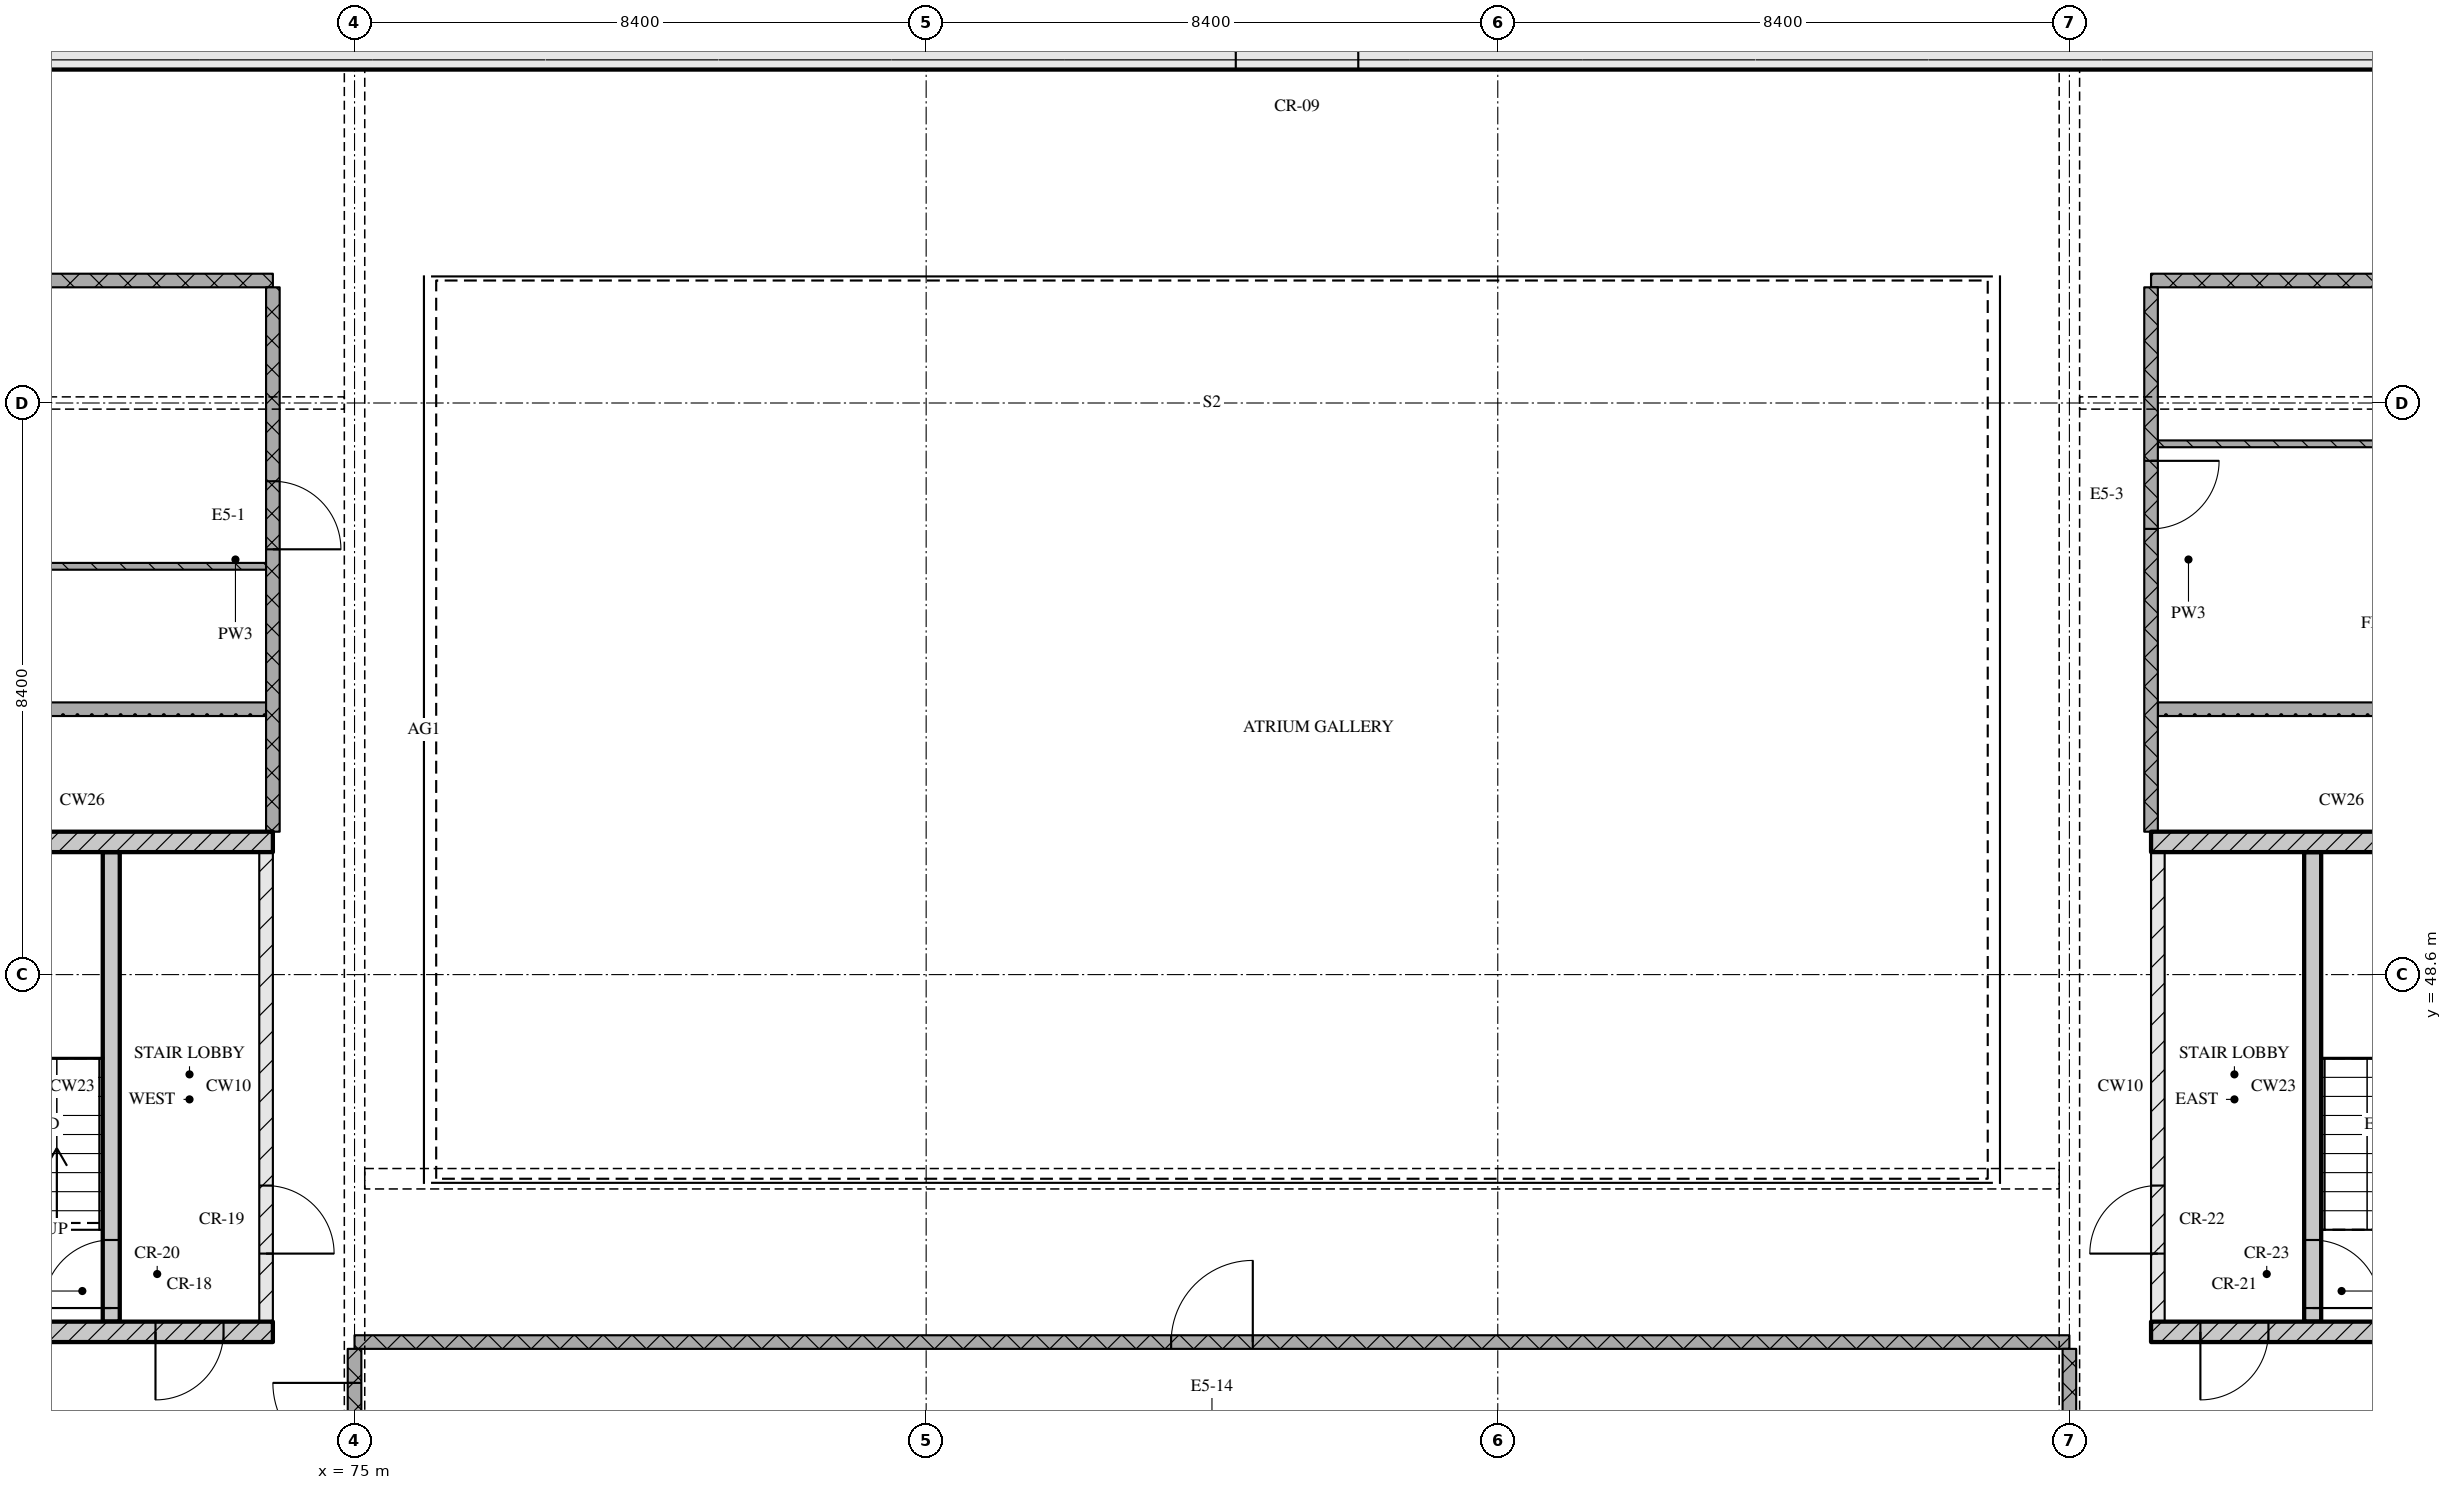
"""IFC4 building model, lengths in metres.
Left out: names, types, materials, properties, quantities, classifications, styles, units other than length and angle.
Written with IfcOpenShell. Run it as: python <this file> out.ifc"""

import sys

from ifc_helpers import new_model, si_unit, direction, frame, frame_2d, origin, place, context, subcontext, project, spatial, rectangle, extrude, element, fill, save


model = new_model("IFC4")
c1 = context("Model", 3, precision=1e-05, world=origin(), true_north=direction((0.0, 1.0)))
c2 = subcontext(c1, "Body", "Model", "MODEL_VIEW")
j1 = project(units=[si_unit("LENGTHUNIT", "METRE"), si_unit("PLANEANGLEUNIT", "RADIAN")], contexts=[c1])
p1 = place(None, origin())
s1 = spatial("IfcSite", under=j1, at=p1, CompositionType="ELEMENT")
p2 = place(p1, origin())
s2 = spatial("IfcBuilding", under=s1, at=p2, CompositionType="ELEMENT")
p3 = place(p2, frame((0.0, 0.0, 288.75)))
s3 = spatial("IfcBuildingStorey", under=s2, at=p3, CompositionType="ELEMENT", Elevation=288.75)
p4 = place(p3, frame((67.3, 62.15, 0.0), z_axis=(0.0, 0.0, 1.0), x_axis=(1.0, 0.0, 0.0)))
e1 = element("IfcWall", 1, at=p4, inside=s3, PredefinedType="SOLIDWALL", context=c2, shape_type="SweptSolid", body=[
    extrude(rectangle(XDim=40.6, YDim=0.5, at=frame_2d((20.3, 0.0))), origin(), (0.0, 0.0, 1.0), 3.32),
])
p5 = place(p4, frame((20.65, 0.0, 0.0)))
e2 = element("IfcOpeningElement", 2, at=p5, cuts=e1, PredefinedType="OPENING", context=c2, shape_type="SweptSolid", body=[
    extrude(rectangle(XDim=1.8, YDim=2.1, at=frame_2d((0.9, 1.05))), frame((0.0, 0.26, 0.0), z_axis=(0.0, -1.0, 0.0), x_axis=(1.0, 0.0, 0.0)), (0.0, 0.0, 1.0), 0.52),
])
p6 = place(p3, frame((68.2, 43.35, 0.0), z_axis=(0.0, 0.0, 1.0), x_axis=(1.0, 0.0, 0.0)))
e3 = element("IfcWall", 3, at=p6, inside=s3, PredefinedType="SOLIDWALL", context=c2, shape_type="SweptSolid", body=[
    extrude(rectangle(XDim=5.6, YDim=0.3, at=frame_2d((2.8, 0.0))), origin(), (0.0, 0.0, 1.0), 3.32),
])
p7 = place(p6, frame((3.875, 0.0, 0.0)))
e4 = element("IfcOpeningElement", 4, at=p7, cuts=e3, PredefinedType="OPENING", context=c2, shape_type="SweptSolid", body=[
    extrude(rectangle(XDim=1.0, YDim=2.1, at=frame_2d((0.5, 1.05))), frame((0.0, 0.16, 0.0), z_axis=(0.0, -1.0, 0.0), x_axis=(1.0, 0.0, 0.0)), (0.0, 0.0, 1.0), 0.32),
])
p8 = place(p3, frame((71.425, 43.5, 0.0), z_axis=(0.0, 0.0, 1.0), x_axis=(0.0, 1.0, 0.0)))
e5 = element("IfcWall", 5, at=p8, inside=s3, PredefinedType="SOLIDWALL", context=c2, shape_type="SweptSolid", body=[
    extrude(rectangle(XDim=6.9, YDim=0.25, at=frame_2d((3.45, 0.0))), origin(), (0.0, 0.0, 1.0), 3.32),
])
p9 = place(p8, frame((0.2, 0.0, 0.0)))
e6 = element("IfcOpeningElement", 6, at=p9, cuts=e5, PredefinedType="OPENING", context=c2, shape_type="SweptSolid", body=[
    extrude(rectangle(XDim=1.0, YDim=2.1, at=frame_2d((0.5, 1.05))), frame((0.0, 0.135, 0.0), z_axis=(0.0, -1.0, 0.0), x_axis=(1.0, 0.0, 0.0)), (0.0, 0.0, 1.0), 0.27),
])
p10 = place(p3, frame((73.7, 43.5, 0.0), z_axis=(0.0, 0.0, 1.0), x_axis=(0.0, 1.0, 0.0)))
e7 = element("IfcWall", 7, at=p10, inside=s3, PredefinedType="PARTITIONING", context=c2, shape_type="SweptSolid", body=[
    extrude(rectangle(XDim=6.9, YDim=0.2, at=frame_2d((3.45, 0.0))), origin(), (0.0, 0.0, 1.0), 3.32),
])
p11 = place(p10, frame((1.0, 0.0, 0.0)))
e8 = element("IfcOpeningElement", 8, at=p11, cuts=e7, PredefinedType="OPENING", context=c2, shape_type="SweptSolid", body=[
    extrude(rectangle(XDim=1.0, YDim=2.1, at=frame_2d((0.5, 1.05))), frame((0.0, 0.11, 0.0), z_axis=(0.0, -1.0, 0.0), x_axis=(1.0, 0.0, 0.0)), (0.0, 0.0, 1.0), 0.22),
])
p12 = place(p3, frame((68.2, 50.55, 0.0), z_axis=(0.0, 0.0, 1.0), x_axis=(1.0, 0.0, 0.0)))
e9 = element("IfcWall", 9, at=p12, inside=s3, PredefinedType="SOLIDWALL", context=c2, shape_type="SweptSolid", body=[
    extrude(rectangle(XDim=5.6, YDim=0.3, at=frame_2d((2.8, 0.0))), origin(), (0.0, 0.0, 1.0), 3.32),
])
p13 = place(p3, frame((101.4, 43.35, 0.0), z_axis=(0.0, 0.0, 1.0), x_axis=(1.0, 0.0, 0.0)))
e10 = element("IfcWall", 10, at=p13, inside=s3, PredefinedType="SOLIDWALL", context=c2, shape_type="SweptSolid", body=[
    extrude(rectangle(XDim=5.6, YDim=0.3, at=frame_2d((2.8, 0.0))), origin(), (0.0, 0.0, 1.0), 3.32),
])
p14 = place(p13, frame((0.725, 0.0, 0.0)))
e11 = element("IfcOpeningElement", 11, at=p14, cuts=e10, PredefinedType="OPENING", context=c2, shape_type="SweptSolid", body=[
    extrude(rectangle(XDim=1.0, YDim=2.1, at=frame_2d((0.5, 1.05))), frame((0.0, 0.16, 0.0), z_axis=(0.0, -1.0, 0.0), x_axis=(1.0, 0.0, 0.0)), (0.0, 0.0, 1.0), 0.32),
])
p15 = place(p3, frame((101.5, 43.5, 0.0), z_axis=(0.0, 0.0, 1.0), x_axis=(0.0, 1.0, 0.0)))
e12 = element("IfcWall", 12, at=p15, inside=s3, PredefinedType="PARTITIONING", context=c2, shape_type="SweptSolid", body=[
    extrude(rectangle(XDim=6.9, YDim=0.2, at=frame_2d((3.45, 0.0))), origin(), (0.0, 0.0, 1.0), 3.32),
])
p16 = place(p15, frame((1.0, 0.0, 0.0)))
e13 = element("IfcOpeningElement", 13, at=p16, cuts=e12, PredefinedType="OPENING", context=c2, shape_type="SweptSolid", body=[
    extrude(rectangle(XDim=1.0, YDim=2.1, at=frame_2d((0.5, 1.05))), frame((0.0, 0.11, 0.0), z_axis=(0.0, -1.0, 0.0), x_axis=(1.0, 0.0, 0.0)), (0.0, 0.0, 1.0), 0.22),
])
p17 = place(p3, frame((103.775, 43.5, 0.0), z_axis=(0.0, 0.0, 1.0), x_axis=(0.0, 1.0, 0.0)))
e14 = element("IfcWall", 14, at=p17, inside=s3, PredefinedType="SOLIDWALL", context=c2, shape_type="SweptSolid", body=[
    extrude(rectangle(XDim=6.9, YDim=0.25, at=frame_2d((3.45, 0.0))), origin(), (0.0, 0.0, 1.0), 3.32),
])
p18 = place(p17, frame((0.2, 0.0, 0.0)))
e15 = element("IfcOpeningElement", 15, at=p18, cuts=e14, PredefinedType="OPENING", context=c2, shape_type="SweptSolid", body=[
    extrude(rectangle(XDim=1.0, YDim=2.1, at=frame_2d((0.5, 1.05))), frame((0.0, 0.135, 0.0), z_axis=(0.0, -1.0, 0.0), x_axis=(1.0, 0.0, 0.0)), (0.0, 0.0, 1.0), 0.27),
])
p19 = place(p3, frame((101.4, 50.55, 0.0), z_axis=(0.0, 0.0, 1.0), x_axis=(1.0, 0.0, 0.0)))
e16 = element("IfcWall", 16, at=p19, inside=s3, PredefinedType="SOLIDWALL", context=c2, shape_type="SweptSolid", body=[
    extrude(rectangle(XDim=5.6, YDim=0.3, at=frame_2d((2.8, 0.0))), origin(), (0.0, 0.0, 1.0), 3.32),
])
p20 = place(p3, frame((100.2, 43.2, 0.0), z_axis=(0.0, 0.0, 1.0), x_axis=(-1.0, 0.0, 0.0)))
e17 = element("IfcWall", 17, at=p20, inside=s3, PredefinedType="PARTITIONING", context=c2, shape_type="SweptSolid", body=[
    extrude(rectangle(XDim=25.2, YDim=0.2, at=frame_2d((12.6, 0.0))), origin(), (0.0, 0.0, 1.0), 3.32),
])
p21 = place(p20, frame((12.0, 0.0, 0.0)))
e18 = element("IfcOpeningElement", 18, at=p21, cuts=e17, PredefinedType="OPENING", context=c2, shape_type="SweptSolid", body=[
    extrude(rectangle(XDim=1.2, YDim=2.1, at=frame_2d((0.6, 1.05))), frame((0.0, 0.11, 0.0), z_axis=(0.0, -1.0, 0.0), x_axis=(1.0, 0.0, 0.0)), (0.0, 0.0, 1.0), 0.22),
])
for number, where, z_axis, x_axis in (
    (19, (56.68, 52.5, 0.0), (0.0, 0.0, 1.0), (1.0, 0.0, 0.0)),
    (20, (101.5, 52.5, 0.0), (0.0, 0.0, 1.0), (1.0, 0.0, 0.0)),
):
    element("IfcWall", number, at=place(p3, frame(where, z_axis=z_axis, x_axis=x_axis)), inside=s3, PredefinedType="PARTITIONING", context=c2, shape_type="SweptSolid", body=[
        extrude(rectangle(XDim=17.02, YDim=0.2, at=frame_2d((8.51, 0.0))), origin(), (0.0, 0.0, 1.0), 3.32),
    ])
p22 = place(p3, frame((73.7, 54.6, 0.0), z_axis=(0.0, 0.0, 1.0), x_axis=(-1.0, 0.0, 0.0)))
e21 = element("IfcWall", 21, at=p22, inside=s3, PredefinedType="PARTITIONING", context=c2, shape_type="SweptSolid", body=[
    extrude(rectangle(XDim=8.9, YDim=0.1, at=frame_2d((4.45, 0.0))), origin(), (0.0, 0.0, 1.0), 3.32),
])
p23 = place(p22, frame((4.0, 0.0, 0.0)))
e22 = element("IfcOpeningElement", 22, at=p23, cuts=e21, PredefinedType="OPENING", context=c2, shape_type="SweptSolid", body=[
    extrude(rectangle(XDim=0.8, YDim=2.1, at=frame_2d((0.4, 1.05))), frame((0.0, 0.06, 0.0), z_axis=(0.0, -1.0, 0.0), x_axis=(1.0, 0.0, 0.0)), (0.0, 0.0, 1.0), 0.12),
])
p24 = place(p3, frame((101.5, 56.4, 0.0), z_axis=(0.0, 0.0, 1.0), x_axis=(1.0, 0.0, 0.0)))
e23 = element("IfcWall", 23, at=p24, inside=s3, PredefinedType="PARTITIONING", context=c2, shape_type="SweptSolid", body=[
    extrude(rectangle(XDim=8.0, YDim=0.1, at=frame_2d((4.0, 0.0))), origin(), (0.0, 0.0, 1.0), 3.32),
])
p25 = place(p24, frame((3.55, 0.0, 0.0)))
e24 = element("IfcOpeningElement", 24, at=p25, cuts=e23, PredefinedType="OPENING", context=c2, shape_type="SweptSolid", body=[
    extrude(rectangle(XDim=0.8, YDim=2.1, at=frame_2d((0.4, 1.05))), frame((0.0, 0.06, 0.0), z_axis=(0.0, -1.0, 0.0), x_axis=(1.0, 0.0, 0.0)), (0.0, 0.0, 1.0), 0.12),
])
for number, where, z_axis, x_axis in (
    (25, (64.2, 58.8, 0.0), (0.0, 0.0, 1.0), (1.0, 0.0, 0.0)),
    (26, (101.4, 58.8, 0.0), (0.0, 0.0, 1.0), (1.0, 0.0, 0.0)),
):
    element("IfcWall", number, at=place(p3, frame(where, z_axis=z_axis, x_axis=x_axis)), inside=s3, PredefinedType="PARTITIONING", context=c2, shape_type="SweptSolid", body=[
        extrude(rectangle(XDim=9.6, YDim=0.2, at=frame_2d((4.8, 0.0))), origin(), (0.0, 0.0, 1.0), 3.32),
    ])
p26 = place(p3, frame((73.8, 50.7, 0.0), z_axis=(0.0, 0.0, 1.0), x_axis=(0.0, 1.0, 0.0)))
e27 = element("IfcWall", 27, at=p26, inside=s3, PredefinedType="PARTITIONING", context=c2, shape_type="SweptSolid", body=[
    extrude(rectangle(XDim=8.0, YDim=0.2, at=frame_2d((4.0, 0.0))), origin(), (0.0, 0.0, 1.0), 3.32),
])
p27 = place(p26, frame((4.15, 0.0, 0.0)))
e28 = element("IfcOpeningElement", 28, at=p27, cuts=e27, PredefinedType="OPENING", context=c2, shape_type="SweptSolid", body=[
    extrude(rectangle(XDim=1.0, YDim=2.1, at=frame_2d((0.5, 1.05))), frame((0.0, 0.11, 0.0), z_axis=(0.0, -1.0, 0.0), x_axis=(1.0, 0.0, 0.0)), (0.0, 0.0, 1.0), 0.22),
])
p28 = place(p3, frame((75.0, 43.1, 0.0), z_axis=(0.0, 0.0, 1.0), x_axis=(0.0, -1.0, 0.0)))
e29 = element("IfcWall", 29, at=p28, inside=s3, PredefinedType="PARTITIONING", context=c2, shape_type="SweptSolid", body=[
    extrude(rectangle(XDim=2.2, YDim=0.2, at=frame_2d((1.1, 0.0))), origin(), (0.0, 0.0, 1.0), 2.53),
])
p29 = place(p28, frame((0.5, 0.0, 0.0)))
e30 = element("IfcOpeningElement", 30, at=p29, cuts=e29, PredefinedType="OPENING", context=c2, shape_type="SweptSolid", body=[
    extrude(rectangle(XDim=1.2, YDim=2.1, at=frame_2d((0.6, 1.05))), frame((0.0, 0.11, 0.0), z_axis=(0.0, -1.0, 0.0), x_axis=(1.0, 0.0, 0.0)), (0.0, 0.0, 1.0), 0.22),
])
p30 = place(p3, frame((100.2, 43.1, 0.0), z_axis=(0.0, 0.0, 1.0), x_axis=(0.0, -1.0, 0.0)))
e31 = element("IfcWall", 31, at=p30, inside=s3, PredefinedType="PARTITIONING", context=c2, shape_type="SweptSolid", body=[
    extrude(rectangle(XDim=2.2, YDim=0.2, at=frame_2d((1.1, 0.0))), origin(), (0.0, 0.0, 1.0), 2.53),
])
p31 = place(p3, frame((101.4, 58.7, 0.0), z_axis=(0.0, 0.0, 1.0), x_axis=(0.0, -1.0, 0.0)))
e32 = element("IfcWall", 32, at=p31, inside=s3, PredefinedType="PARTITIONING", context=c2, shape_type="SweptSolid", body=[
    extrude(rectangle(XDim=8.0, YDim=0.2, at=frame_2d((4.0, 0.0))), origin(), (0.0, 0.0, 1.0), 3.32),
])
p32 = place(p31, frame((2.55, 0.0, 0.0)))
e33 = element("IfcOpeningElement", 33, at=p32, cuts=e32, PredefinedType="OPENING", context=c2, shape_type="SweptSolid", body=[
    extrude(rectangle(XDim=1.0, YDim=2.1, at=frame_2d((0.5, 1.05))), frame((0.0, 0.11, 0.0), z_axis=(0.0, -1.0, 0.0), x_axis=(1.0, 0.0, 0.0)), (0.0, 0.0, 1.0), 0.22),
])
p33 = place(p5, origin())
e34 = element("IfcDoor", 34, at=p33, inside=s3, OperationType="DOUBLE_DOOR_SINGLE_SWING", PredefinedType="DOOR", context=c2, shape_type="SweptSolid", body=[
    extrude(rectangle(XDim=1.8, YDim=2.1, at=frame_2d((0.9, 1.05))), frame((0.0, 0.025, 0.0), z_axis=(0.0, -1.0, 0.0), x_axis=(1.0, 0.0, 0.0)), (0.0, 0.0, 1.0), 0.05),
])
fill(e2, e34)
p34 = place(p7, origin())
e35 = element("IfcDoor", 35, at=p34, inside=s3, OperationType="SINGLE_SWING_RIGHT", PredefinedType="DOOR", context=c2, shape_type="SweptSolid", body=[
    extrude(rectangle(XDim=1.0, YDim=2.1, at=frame_2d((0.5, 1.05))), frame((0.0, 0.025, 0.0), z_axis=(0.0, -1.0, 0.0), x_axis=(1.0, 0.0, 0.0)), (0.0, 0.0, 1.0), 0.05),
])
fill(e4, e35)
p35 = place(p9, origin())
e36 = element("IfcDoor", 36, at=p35, inside=s3, OperationType="SINGLE_SWING_LEFT", PredefinedType="DOOR", context=c2, shape_type="SweptSolid", body=[
    extrude(rectangle(XDim=1.0, YDim=2.1, at=frame_2d((0.5, 1.05))), frame((0.0, 0.025, 0.0), z_axis=(0.0, -1.0, 0.0), x_axis=(1.0, 0.0, 0.0)), (0.0, 0.0, 1.0), 0.05),
])
fill(e6, e36)
p36 = place(p11, origin())
e37 = element("IfcDoor", 37, at=p36, inside=s3, OperationType="SINGLE_SWING_RIGHT", PredefinedType="DOOR", context=c2, shape_type="SweptSolid", body=[
    extrude(rectangle(XDim=1.0, YDim=2.1, at=frame_2d((0.5, 1.05))), frame((0.0, 0.025, 0.0), z_axis=(0.0, -1.0, 0.0), x_axis=(1.0, 0.0, 0.0)), (0.0, 0.0, 1.0), 0.05),
])
fill(e8, e37)
p37 = place(p14, origin())
e38 = element("IfcDoor", 38, at=p37, inside=s3, OperationType="SINGLE_SWING_RIGHT", PredefinedType="DOOR", context=c2, shape_type="SweptSolid", body=[
    extrude(rectangle(XDim=1.0, YDim=2.1, at=frame_2d((0.5, 1.05))), frame((0.0, 0.025, 0.0), z_axis=(0.0, -1.0, 0.0), x_axis=(1.0, 0.0, 0.0)), (0.0, 0.0, 1.0), 0.05),
])
fill(e11, e38)
p38 = place(p18, origin())
e39 = element("IfcDoor", 39, at=p38, inside=s3, OperationType="SINGLE_SWING_RIGHT", PredefinedType="DOOR", context=c2, shape_type="SweptSolid", body=[
    extrude(rectangle(XDim=1.0, YDim=2.1, at=frame_2d((0.5, 1.05))), frame((0.0, 0.025, 0.0), z_axis=(0.0, -1.0, 0.0), x_axis=(1.0, 0.0, 0.0)), (0.0, 0.0, 1.0), 0.05),
])
fill(e15, e39)
p39 = place(p16, origin())
e40 = element("IfcDoor", 40, at=p39, inside=s3, OperationType="SINGLE_SWING_LEFT", PredefinedType="DOOR", context=c2, shape_type="SweptSolid", body=[
    extrude(rectangle(XDim=1.0, YDim=2.1, at=frame_2d((0.5, 1.05))), frame((0.0, 0.025, 0.0), z_axis=(0.0, -1.0, 0.0), x_axis=(1.0, 0.0, 0.0)), (0.0, 0.0, 1.0), 0.05),
])
fill(e13, e40)
p40 = place(p21, origin())
e41 = element("IfcDoor", 41, at=p40, inside=s3, OperationType="SINGLE_SWING_RIGHT", PredefinedType="DOOR", context=c2, shape_type="SweptSolid", body=[
    extrude(rectangle(XDim=1.2, YDim=2.1, at=frame_2d((0.6, 1.05))), frame((0.0, 0.025, 0.0), z_axis=(0.0, -1.0, 0.0), x_axis=(1.0, 0.0, 0.0)), (0.0, 0.0, 1.0), 0.05),
])
fill(e18, e41)
p41 = place(p27, origin())
e42 = element("IfcDoor", 42, at=p41, inside=s3, OperationType="SINGLE_SWING_RIGHT", PredefinedType="DOOR", context=c2, shape_type="SweptSolid", body=[
    extrude(rectangle(XDim=1.0, YDim=2.1, at=frame_2d((0.5, 1.05))), frame((0.0, 0.025, 0.0), z_axis=(0.0, -1.0, 0.0), x_axis=(1.0, 0.0, 0.0)), (0.0, 0.0, 1.0), 0.05),
])
fill(e28, e42)
p42 = place(p29, origin())
e43 = element("IfcDoor", 43, at=p42, inside=s3, OperationType="SINGLE_SWING_RIGHT", PredefinedType="DOOR", context=c2, shape_type="SweptSolid", body=[
    extrude(rectangle(XDim=1.2, YDim=2.1, at=frame_2d((0.6, 1.05))), frame((0.0, 0.025, 0.0), z_axis=(0.0, -1.0, 0.0), x_axis=(1.0, 0.0, 0.0)), (0.0, 0.0, 1.0), 0.05),
])
fill(e30, e43)
p43 = place(p32, origin())
e44 = element("IfcDoor", 44, at=p43, inside=s3, OperationType="SINGLE_SWING_LEFT", PredefinedType="DOOR", context=c2, shape_type="SweptSolid", body=[
    extrude(rectangle(XDim=1.0, YDim=2.1, at=frame_2d((0.5, 1.05))), frame((0.0, 0.025, 0.0), z_axis=(0.0, -1.0, 0.0), x_axis=(1.0, 0.0, 0.0)), (0.0, 0.0, 1.0), 0.05),
])
fill(e33, e44)
save(model, sys.argv[1])
